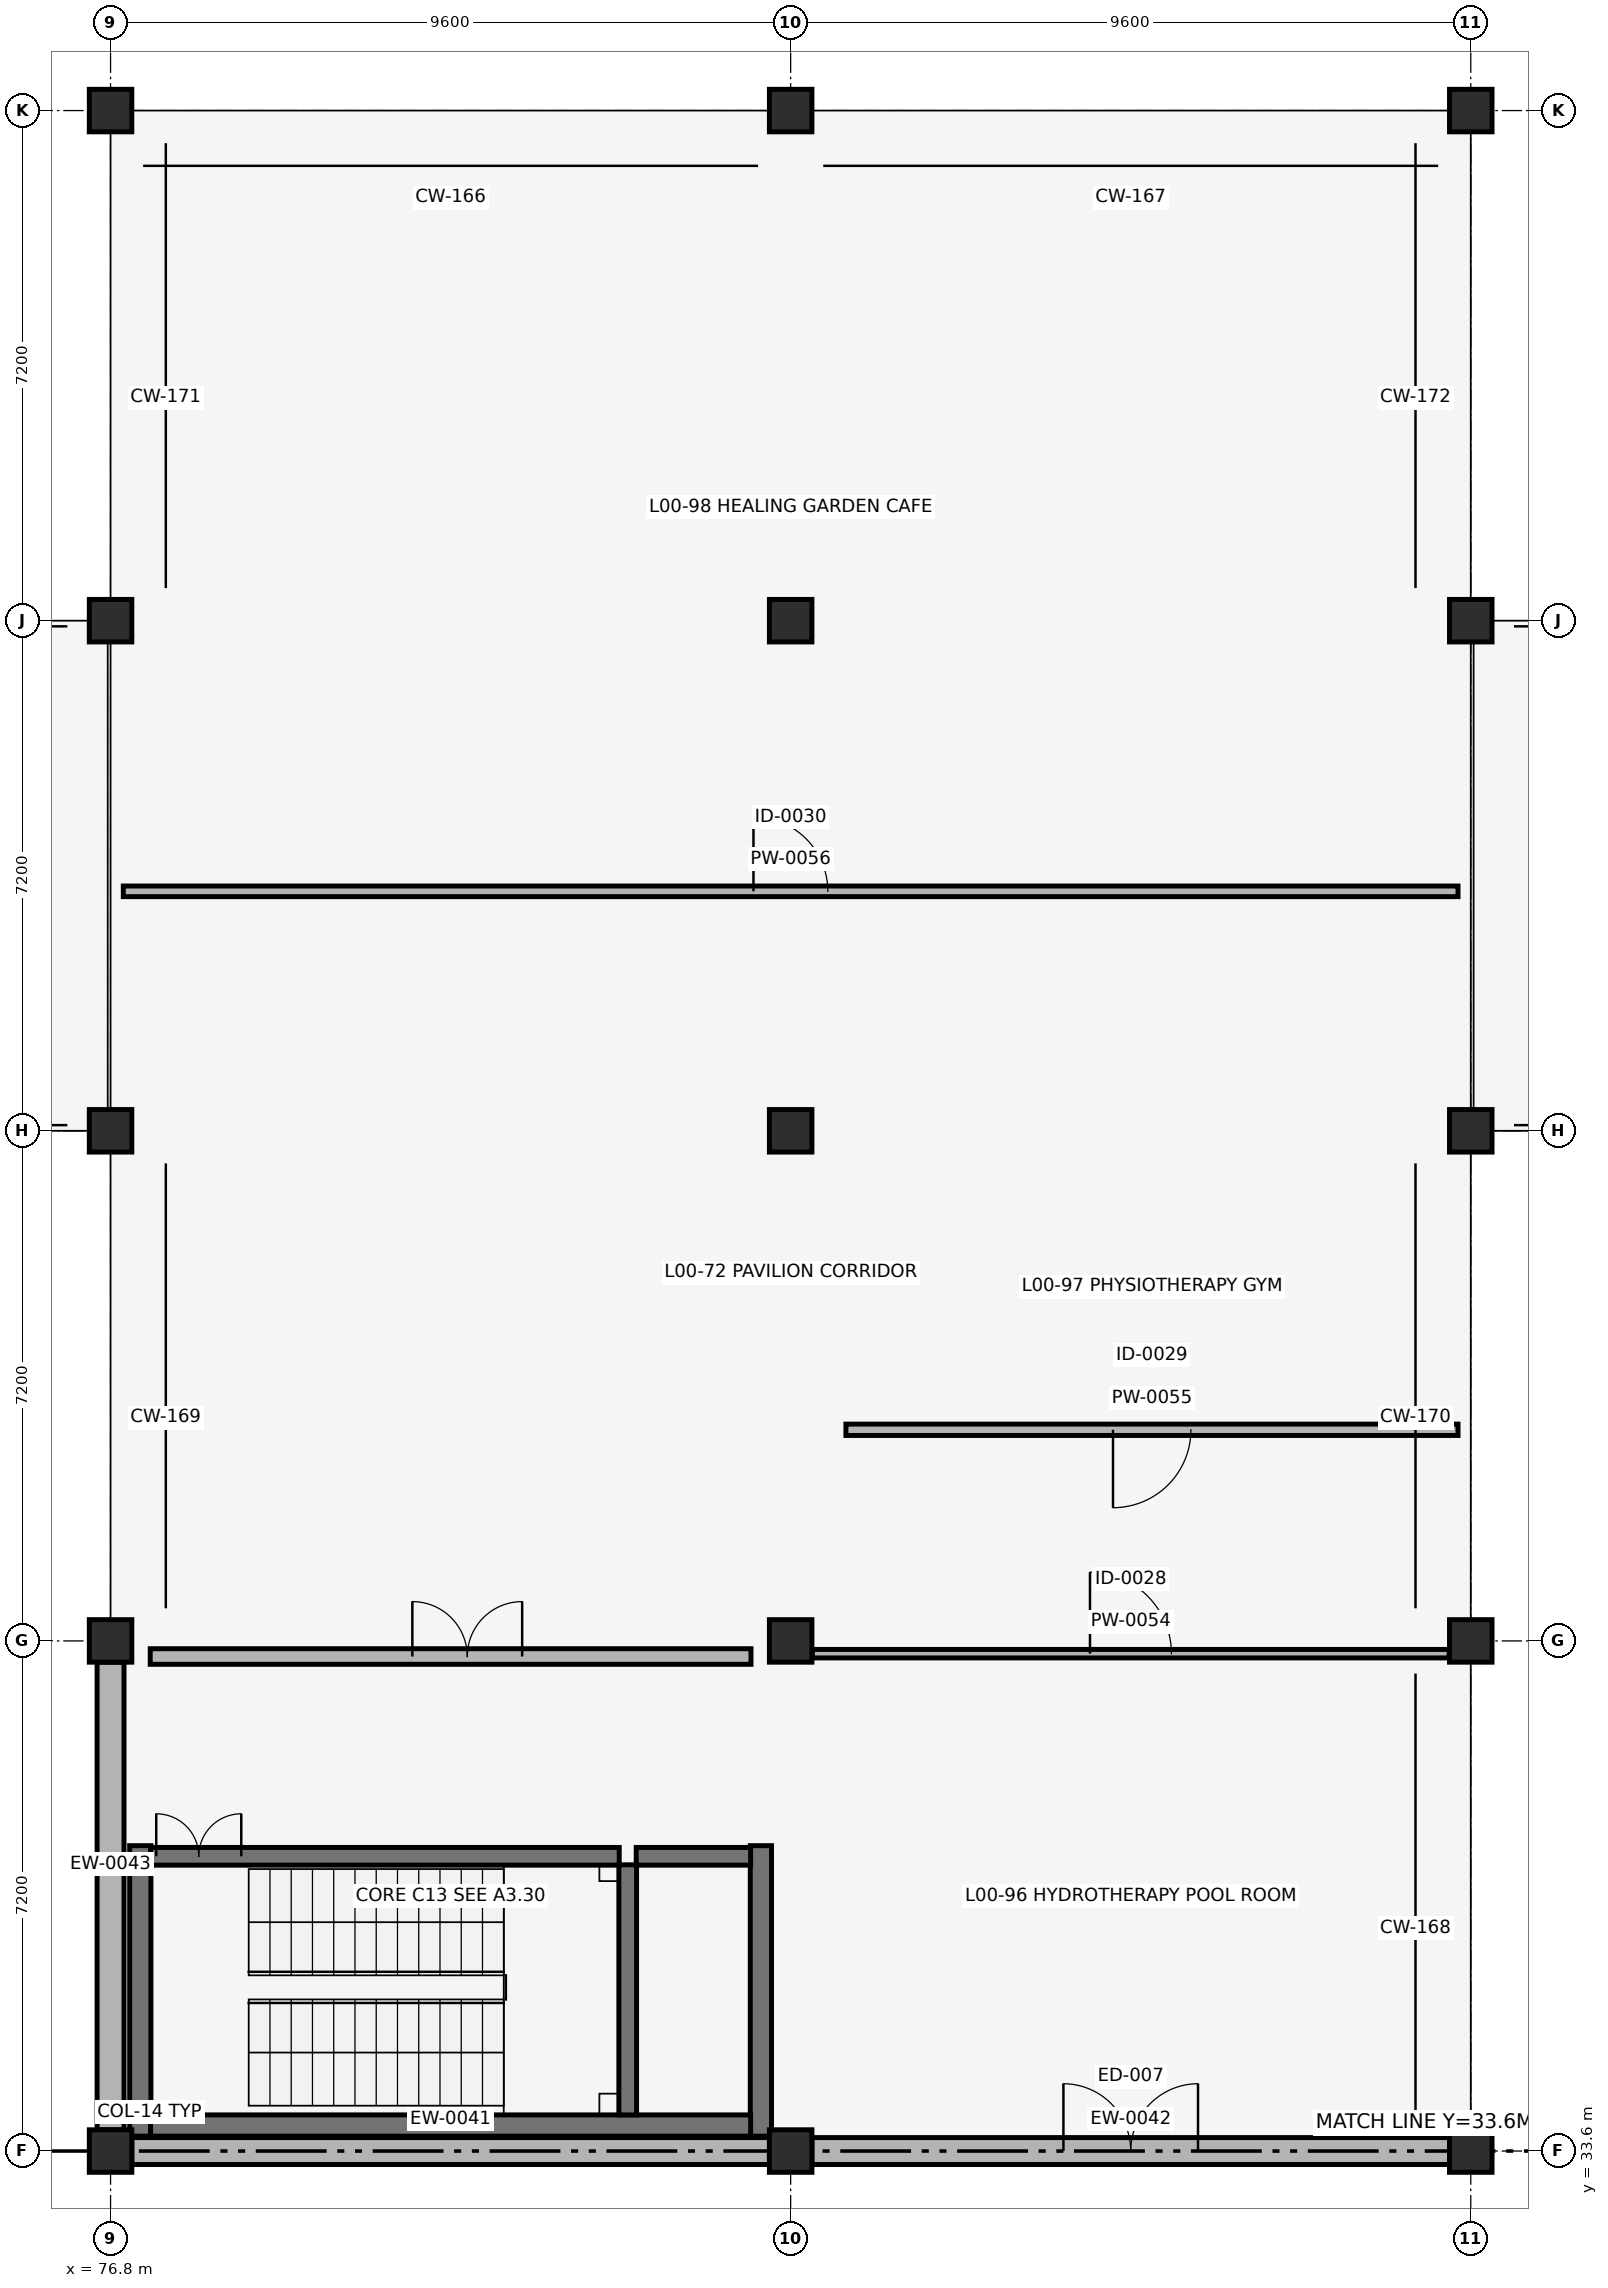
"""IFC4 building model, lengths in metres.
Left out: names, types, materials, properties, quantities, classifications, styles, units other than length and angle.
Written with IfcOpenShell. Run it as: python <this file> out.ifc"""

import sys

from ifc_helpers import new_model, si_unit, direction, frame, frame_2d, origin, origin_2d, place, context, subcontext, project, spatial, rectangle, circle, extrude, element, fill, save


model = new_model("IFC4")
c1 = context("Model", 3, precision=1e-05, world=origin(), true_north=direction((0.0, 1.0)))
c2 = subcontext(c1, "Body", "Model", "MODEL_VIEW")
j1 = project(units=[si_unit("LENGTHUNIT", "METRE"), si_unit("PLANEANGLEUNIT", "RADIAN")], contexts=[c1])
p1 = place(None, origin())
s1 = spatial("IfcSite", under=j1, at=p1, CompositionType="ELEMENT")
p2 = place(p1, origin())
s2 = spatial("IfcBuilding", under=s1, at=p2, CompositionType="ELEMENT")
p3 = place(p2, origin())
s3 = spatial("IfcBuildingStorey", under=s2, at=p3, CompositionType="ELEMENT", Elevation=0.0)
for number, where, z_axis, x_axis in (
    (1, (76.8, 33.6, -0.44), (0.0, 0.0, 1.0), (1.0, 0.0, 0.0)),
    (2, (76.8, 40.8, -0.44), (0.0, 0.0, 1.0), (1.0, 0.0, 0.0)),
    (3, (76.8, 48.0, -0.44), (0.0, 0.0, 1.0), (1.0, 0.0, 0.0)),
    (4, (76.8, 55.2, -0.44), (0.0, 0.0, 1.0), (1.0, 0.0, 0.0)),
    (5, (76.8, 62.4, -0.44), (0.0, 0.0, 1.0), (1.0, 0.0, 0.0)),
    (6, (86.4, 33.6, -0.44), (0.0, 0.0, 1.0), (1.0, 0.0, 0.0)),
    (7, (86.4, 40.8, -0.44), (0.0, 0.0, 1.0), (1.0, 0.0, 0.0)),
    (8, (86.4, 48.0, -0.44), (0.0, 0.0, 1.0), (1.0, 0.0, 0.0)),
    (9, (86.4, 55.2, -0.44), (0.0, 0.0, 1.0), (1.0, 0.0, 0.0)),
    (10, (86.4, 62.4, -0.44), (0.0, 0.0, 1.0), (1.0, 0.0, 0.0)),
    (11, (96.0, 33.6, -0.44), (0.0, 0.0, 1.0), (1.0, 0.0, 0.0)),
    (12, (96.0, 40.8, -0.44), (0.0, 0.0, 1.0), (1.0, 0.0, 0.0)),
    (13, (96.0, 48.0, -0.44), (0.0, 0.0, 1.0), (1.0, 0.0, 0.0)),
    (14, (96.0, 55.2, -0.44), (0.0, 0.0, 1.0), (1.0, 0.0, 0.0)),
    (15, (96.0, 62.4, -0.44), (0.0, 0.0, 1.0), (1.0, 0.0, 0.0)),
):
    element("IfcColumn", number, at=place(p3, frame(where, z_axis=z_axis, x_axis=x_axis)), inside=s3, PredefinedType="COLUMN", context=c2, shape_type="SweptSolid", body=[
        extrude(circle(Radius=0.3, at=origin_2d()), origin(), (0.0, 0.0, 1.0), 4.86),
    ])
p4 = place(p3, frame((77.1, 33.6, 0.0), z_axis=(0.0, 0.0, 1.0), x_axis=(1.0, 0.0, 0.0)))
e16 = element("IfcWall", 16, at=p4, inside=s3, PredefinedType="SOLIDWALL", context=c2, shape_type="SweptSolid", body=[
    extrude(rectangle(XDim=9.0, YDim=0.38, at=frame_2d((4.5, 0.0))), origin(), (0.0, 0.0, 1.0), 3.44),
])
p5 = place(p3, frame((86.7, 33.6, 0.0), z_axis=(0.0, 0.0, 1.0), x_axis=(1.0, 0.0, 0.0)))
e17 = element("IfcWall", 17, at=p5, inside=s3, PredefinedType="SOLIDWALL", context=c2, shape_type="SweptSolid", body=[
    extrude(rectangle(XDim=9.0, YDim=0.38, at=frame_2d((4.5, 0.0))), origin(), (0.0, 0.0, 1.0), 3.44),
])
p6 = place(p5, frame((3.55, 0.0, 0.0)))
e18 = element("IfcOpeningElement", 18, at=p6, cuts=e17, PredefinedType="OPENING", context=c2, shape_type="SweptSolid", body=[
    extrude(rectangle(XDim=1.9, YDim=2.25, at=frame_2d((0.95, 1.125))), frame((0.0, 0.2, 0.0), z_axis=(0.0, -1.0, 0.0), x_axis=(1.0, 0.0, 0.0)), (0.0, 0.0, 1.0), 0.4),
])
p7 = place(p3, frame((76.8, 40.5, 0.0), z_axis=(0.0, 0.0, 1.0), x_axis=(0.0, -1.0, 0.0)))
e19 = element("IfcWall", 19, at=p7, inside=s3, PredefinedType="SOLIDWALL", context=c2, shape_type="SweptSolid", body=[
    extrude(rectangle(XDim=6.6, YDim=0.38, at=frame_2d((3.3, 0.0))), origin(), (0.0, 0.0, 1.0), 3.44),
])
for number, where, z_axis, x_axis in (
    (20, (77.22, 33.81, 0.0), (0.0, 0.0, 1.0), (0.0, 1.0, 0.0)),
    (21, (85.98, 33.81, 0.0), (0.0, 0.0, 1.0), (0.0, 1.0, 0.0)),
):
    element("IfcWall", number, at=place(p3, frame(where, z_axis=z_axis, x_axis=x_axis)), inside=s3, PredefinedType="SHEAR", context=c2, shape_type="SweptSolid", body=[
        extrude(rectangle(XDim=4.1, YDim=0.3, at=frame_2d((2.05, 0.0))), origin(), (0.0, 0.0, 1.0), 4.16),
    ])
p8 = place(p3, frame((77.365, 33.96, 0.0), z_axis=(0.0, 0.0, 1.0), x_axis=(1.0, 0.0, 0.0)))
e22 = element("IfcWall", 22, at=p8, inside=s3, PredefinedType="SHEAR", context=c2, shape_type="SweptSolid", body=[
    extrude(rectangle(XDim=8.47, YDim=0.3, at=frame_2d((4.235, 0.0))), origin(), (0.0, 0.0, 1.0), 4.16),
])
p9 = place(p3, frame((84.1, 34.11, 0.0), z_axis=(0.0, 0.0, 1.0), x_axis=(0.0, 1.0, 0.0)))
e23 = element("IfcWall", 23, at=p9, inside=s3, PredefinedType="SHEAR", context=c2, shape_type="SweptSolid", body=[
    extrude(rectangle(XDim=3.53, YDim=0.25, at=frame_2d((1.765, 0.0))), origin(), (0.0, 0.0, 1.0), 4.16),
])
p10 = place(p3, frame((77.365, 37.76, 0.0), z_axis=(0.0, 0.0, 1.0), x_axis=(1.0, 0.0, 0.0)))
e24 = element("IfcWall", 24, at=p10, inside=s3, PredefinedType="SHEAR", context=c2, shape_type="SweptSolid", body=[
    extrude(rectangle(XDim=6.615, YDim=0.25, at=frame_2d((3.308, 0.0))), origin(), (0.0, 0.0, 1.0), 4.16),
])
p11 = place(p10, frame((0.08, 0.0, 0.0)))
e25 = element("IfcOpeningElement", 25, at=p11, cuts=e24, PredefinedType="OPENING", context=c2, shape_type="SweptSolid", body=[
    extrude(rectangle(XDim=1.2, YDim=2.15, at=frame_2d((0.6, 1.075))), frame((0.0, 0.135, 0.0), z_axis=(0.0, -1.0, 0.0), x_axis=(1.0, 0.0, 0.0)), (0.0, 0.0, 1.0), 0.27),
])
p12 = place(p3, frame((77.36, 40.58, 0.0), z_axis=(0.0, 0.0, 1.0), x_axis=(1.0, 0.0, 0.0)))
e26 = element("IfcWall", 26, at=p12, inside=s3, PredefinedType="PARTITIONING", context=c2, shape_type="SweptSolid", body=[
    extrude(rectangle(XDim=8.48, YDim=0.22, at=frame_2d((4.24, 0.0))), origin(), (0.0, 0.0, 1.0), 3.54),
])
p13 = place(p12, frame((3.7, 0.0, 0.0)))
e27 = element("IfcOpeningElement", 27, at=p13, cuts=e26, PredefinedType="OPENING", context=c2, shape_type="SweptSolid", body=[
    extrude(rectangle(XDim=1.55, YDim=2.2, at=frame_2d((0.775, 1.1))), frame((0.0, 0.12, 0.0), z_axis=(0.0, -1.0, 0.0), x_axis=(1.0, 0.0, 0.0)), (0.0, 0.0, 1.0), 0.24),
])
p14 = place(p3, frame((84.22, 37.76, 0.0), z_axis=(0.0, 0.0, 1.0), x_axis=(1.0, 0.0, 0.0)))
e28 = element("IfcWall", 28, at=p14, inside=s3, PredefinedType="SHEAR", context=c2, shape_type="SweptSolid", body=[
    extrude(rectangle(XDim=1.615, YDim=0.25, at=frame_2d((0.808, 0.0))), origin(), (0.0, 0.0, 1.0), 4.16),
])
p15 = place(p3, frame((86.705, 40.62, 0.0), z_axis=(0.0, 0.0, 1.0), x_axis=(1.0, 0.0, 0.0)))
e29 = element("IfcWall", 29, at=p15, inside=s3, PredefinedType="PARTITIONING", context=c2, shape_type="SweptSolid", body=[
    extrude(rectangle(XDim=8.99, YDim=0.12, at=frame_2d((4.495, 0.0))), origin(), (0.0, 0.0, 1.0), 3.46),
])
p16 = place(p15, frame((3.92, 0.0, 0.0)))
e30 = element("IfcOpeningElement", 30, at=p16, cuts=e29, PredefinedType="OPENING", context=c2, shape_type="SweptSolid", body=[
    extrude(rectangle(XDim=1.15, YDim=2.1, at=frame_2d((0.575, 1.05))), frame((0.0, 0.07, 0.0), z_axis=(0.0, -1.0, 0.0), x_axis=(1.0, 0.0, 0.0)), (0.0, 0.0, 1.0), 0.14),
])
p17 = place(p3, frame((87.18, 43.78, 0.0), z_axis=(0.0, 0.0, 1.0), x_axis=(1.0, 0.0, 0.0)))
e31 = element("IfcWall", 31, at=p17, inside=s3, PredefinedType="PARTITIONING", context=c2, shape_type="SweptSolid", body=[
    extrude(rectangle(XDim=8.64, YDim=0.16, at=frame_2d((4.32, 0.0))), origin(), (0.0, 0.0, 1.0), 3.46),
])
p18 = place(p17, frame((3.77, 0.0, 0.0)))
e32 = element("IfcOpeningElement", 32, at=p18, cuts=e31, PredefinedType="OPENING", context=c2, shape_type="SweptSolid", body=[
    extrude(rectangle(XDim=1.1, YDim=2.1, at=frame_2d((0.55, 1.05))), frame((0.0, 0.09, 0.0), z_axis=(0.0, -1.0, 0.0), x_axis=(1.0, 0.0, 0.0)), (0.0, 0.0, 1.0), 0.18),
])
p19 = place(p3, frame((76.98, 51.38, 0.0), z_axis=(0.0, 0.0, 1.0), x_axis=(1.0, 0.0, 0.0)))
e33 = element("IfcWall", 33, at=p19, inside=s3, PredefinedType="PARTITIONING", context=c2, shape_type="SweptSolid", body=[
    extrude(rectangle(XDim=18.84, YDim=0.15, at=frame_2d((9.42, 0.0))), origin(), (0.0, 0.0, 1.0), 3.46),
])
p20 = place(p19, frame((8.895, 0.0, 0.0)))
e34 = element("IfcOpeningElement", 34, at=p20, cuts=e33, PredefinedType="OPENING", context=c2, shape_type="SweptSolid", body=[
    extrude(rectangle(XDim=1.05, YDim=2.1, at=frame_2d((0.525, 1.05))), frame((0.0, 0.085, 0.0), z_axis=(0.0, -1.0, 0.0), x_axis=(1.0, 0.0, 0.0)), (0.0, 0.0, 1.0), 0.17),
])
p21 = place(p6, origin())
e35 = element("IfcDoor", 35, at=p21, inside=s3, OperationType="DOUBLE_DOOR_SINGLE_SWING", PredefinedType="DOOR", context=c2, shape_type="SweptSolid", body=[
    extrude(rectangle(XDim=1.9, YDim=2.25, at=frame_2d((0.95, 1.125))), frame((0.0, 0.025, 0.0), z_axis=(0.0, -1.0, 0.0), x_axis=(1.0, 0.0, 0.0)), (0.0, 0.0, 1.0), 0.05),
])
fill(e18, e35)
p22 = place(p11, origin())
e36 = element("IfcDoor", 36, at=p22, inside=s3, OperationType="DOUBLE_DOOR_SINGLE_SWING", PredefinedType="DOOR", context=c2, shape_type="SweptSolid", body=[
    extrude(rectangle(XDim=1.2, YDim=2.15, at=frame_2d((0.6, 1.075))), frame((0.0, 0.025, 0.0), z_axis=(0.0, -1.0, 0.0), x_axis=(1.0, 0.0, 0.0)), (0.0, 0.0, 1.0), 0.05),
])
fill(e25, e36)
p23 = place(p13, origin())
e37 = element("IfcDoor", 37, at=p23, inside=s3, OperationType="DOUBLE_DOOR_SINGLE_SWING", PredefinedType="DOOR", context=c2, shape_type="SweptSolid", body=[
    extrude(rectangle(XDim=1.55, YDim=2.2, at=frame_2d((0.775, 1.1))), frame((0.0, 0.025, 0.0), z_axis=(0.0, -1.0, 0.0), x_axis=(1.0, 0.0, 0.0)), (0.0, 0.0, 1.0), 0.05),
])
fill(e27, e37)
p24 = place(p16, origin())
e38 = element("IfcDoor", 38, at=p24, inside=s3, OperationType="SINGLE_SWING_LEFT", PredefinedType="DOOR", context=c2, shape_type="SweptSolid", body=[
    extrude(rectangle(XDim=1.15, YDim=2.1, at=frame_2d((0.575, 1.05))), frame((0.0, 0.025, 0.0), z_axis=(0.0, -1.0, 0.0), x_axis=(1.0, 0.0, 0.0)), (0.0, 0.0, 1.0), 0.05),
])
fill(e30, e38)
p25 = place(p18, origin())
e39 = element("IfcDoor", 39, at=p25, inside=s3, OperationType="SINGLE_SWING_RIGHT", PredefinedType="DOOR", context=c2, shape_type="SweptSolid", body=[
    extrude(rectangle(XDim=1.1, YDim=2.1, at=frame_2d((0.55, 1.05))), frame((0.0, 0.025, 0.0), z_axis=(0.0, -1.0, 0.0), x_axis=(1.0, 0.0, 0.0)), (0.0, 0.0, 1.0), 0.05),
])
fill(e32, e39)
p26 = place(p20, origin())
e40 = element("IfcDoor", 40, at=p26, inside=s3, OperationType="SINGLE_SWING_LEFT", PredefinedType="DOOR", context=c2, shape_type="SweptSolid", body=[
    extrude(rectangle(XDim=1.05, YDim=2.1, at=frame_2d((0.525, 1.05))), frame((0.0, 0.025, 0.0), z_axis=(0.0, -1.0, 0.0), x_axis=(1.0, 0.0, 0.0)), (0.0, 0.0, 1.0), 0.05),
])
fill(e34, e40)
save(model, sys.argv[1])
